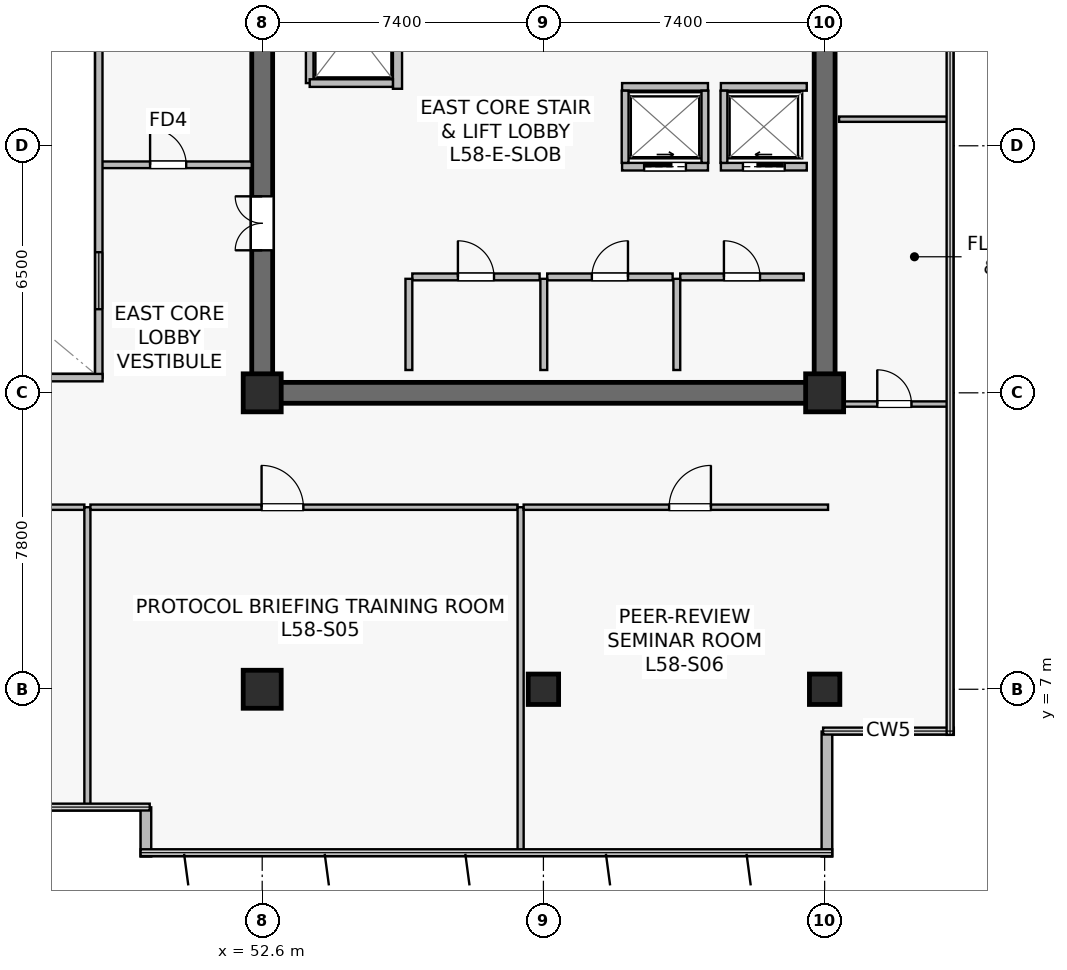
"""IFC4 building model, lengths in metres.
Left out: names, types, materials, properties, quantities, classifications, styles, units other than length and angle.
Written with IfcOpenShell. Run it as: python <this file> out.ifc"""

import sys

from ifc_helpers import new_model, si_unit, direction, frame, frame_2d, origin, origin_2d, place, context, subcontext, project, spatial, rectangle, extrude, source, transform, mapped, element, fill, save


model = new_model("IFC4")
c1 = context("Model", 3, precision=1e-05, world=origin(), true_north=direction((0.0, 1.0)))
c2 = subcontext(c1, "Body", "Model", "MODEL_VIEW")
j1 = project(units=[si_unit("LENGTHUNIT", "METRE"), si_unit("PLANEANGLEUNIT", "RADIAN")], contexts=[c1])
p1 = place(None, origin())
s1 = spatial("IfcSite", under=j1, at=p1, CompositionType="ELEMENT")
p2 = place(p1, origin())
s2 = spatial("IfcBuilding", under=s1, at=p2, CompositionType="ELEMENT")
p3 = place(p2, frame((0.0, 0.0, 242.4)))
s3 = spatial("IfcBuildingStorey", under=s2, at=p3, CompositionType="ELEMENT", Elevation=242.4)
p4 = place(p3, frame((52.325, 14.8, 0.0), z_axis=(0.0, 0.0, 1.0), x_axis=(1.0, 0.0, 0.0)))
e1 = element("IfcWall", 1, at=p4, inside=s3, PredefinedType="SHEAR", context=c2, shape_type="SweptSolid", body=[
    extrude(rectangle(XDim=15.35, YDim=0.55, at=frame_2d((7.675, 0.0))), origin(), (0.0, 0.0, 1.0), 3.8),
])
p5 = place(p3, frame((52.6, 15.075, 0.0), z_axis=(0.0, 0.0, 1.0), x_axis=(0.0, 1.0, 0.0)))
e2 = element("IfcWall", 2, at=p5, inside=s3, PredefinedType="SHEAR", context=c2, shape_type="SweptSolid", body=[
    extrude(rectangle(XDim=18.45, YDim=0.55, at=frame_2d((9.225, 0.0))), origin(), (0.0, 0.0, 1.0), 3.8),
])
p6 = place(p5, frame((3.475, 0.0, 0.0)))
e3 = element("IfcOpeningElement", 3, at=p6, cuts=e2, PredefinedType="OPENING", context=c2, shape_type="SweptSolid", body=[
    extrude(rectangle(XDim=1.42, YDim=2.2, at=frame_2d((0.71, 1.1))), frame((0.0, 0.285, 0.0), z_axis=(0.0, -1.0, 0.0), x_axis=(1.0, 0.0, 0.0)), (0.0, 0.0, 1.0), 0.57),
])
p7 = place(p3, frame((67.4, 15.075, 0.0), z_axis=(0.0, 0.0, 1.0), x_axis=(0.0, 1.0, 0.0)))
e4 = element("IfcWall", 4, at=p7, inside=s3, PredefinedType="SHEAR", context=c2, shape_type="SweptSolid", body=[
    extrude(rectangle(XDim=18.45, YDim=0.55, at=frame_2d((9.225, 0.0))), origin(), (0.0, 0.0, 1.0), 3.8),
])
m1 = source(origin(), c2, "Body", "SweptSolid", [
    extrude(rectangle(XDim=1.0, YDim=1.0, at=origin_2d()), origin(), (0.0, 0.0, 1.0), 4.1),
])
p8 = place(p3, frame((52.6, 7.0, 0.0), z_axis=(0.0, 0.0, 1.0), x_axis=(1.0, 0.0, 0.0)))
e5 = element("IfcColumn", 5, at=p8, inside=s3, PredefinedType="COLUMN", context=c2, shape_type="MappedRepresentation", body=[
    mapped(m1, transform((0.0, 0.0, 0.0), scale=1.0)),
])
m2 = source(origin(), c2, "Body", "SweptSolid", [
    extrude(rectangle(XDim=0.8, YDim=0.8, at=origin_2d()), origin(), (0.0, 0.0, 1.0), 4.1),
])
p9 = place(p3, frame((60.0, 7.0, 0.0), z_axis=(0.0, 0.0, 1.0), x_axis=(1.0, 0.0, 0.0)))
e6 = element("IfcColumn", 6, at=p9, inside=s3, PredefinedType="COLUMN", context=c2, shape_type="MappedRepresentation", body=[
    mapped(m2, transform((0.0, 0.0, 0.0), scale=1.0)),
])
for number, where, z_axis, x_axis in (
    (7, (52.6, 14.8, 0.0), (0.0, 0.0, 1.0), (1.0, 0.0, 0.0)),
    (8, (67.4, 14.8, 0.0), (0.0, 0.0, 1.0), (1.0, 0.0, 0.0)),
):
    element("IfcColumn", number, at=place(p3, frame(where, z_axis=z_axis, x_axis=x_axis)), inside=s3, PredefinedType="COLUMN", context=c2, shape_type="MappedRepresentation", body=[
        mapped(m1, transform((0.0, 0.0, 0.0), scale=1.0)),
    ])
p10 = place(p3, frame((67.4, 7.0, 0.0), z_axis=(0.0, 0.0, 1.0), x_axis=(1.0, 0.0, 0.0)))
e9 = element("IfcColumn", 9, at=p10, inside=s3, PredefinedType="COLUMN", context=c2, shape_type="MappedRepresentation", body=[
    mapped(m2, transform((0.0, 0.0, 0.0), scale=1.0)),
])
p11 = place(p3, frame((49.54, 3.893, 0.0), z_axis=(0.0, 0.0, 1.0), x_axis=(0.0, -1.0, 0.0)))
e10 = element("IfcWall", 10, at=p11, inside=s3, PredefinedType="STANDARD", context=c2, shape_type="SweptSolid", body=[
    extrude(rectangle(XDim=1.293, YDim=0.28, at=frame_2d((0.646, 0.0))), origin(), (0.0, 0.0, 1.0), 3.8),
])
p12 = place(p3, frame((67.46, 2.6, 0.0), z_axis=(0.0, 0.0, 1.0), x_axis=(0.0, 1.0, 0.0)))
e11 = element("IfcWall", 11, at=p12, inside=s3, PredefinedType="STANDARD", context=c2, shape_type="SweptSolid", body=[
    extrude(rectangle(XDim=3.288, YDim=0.28, at=frame_2d((1.644, 0.0))), origin(), (0.0, 0.0, 1.0), 3.8),
])
p13 = place(p3, frame((56.16, 22.8, 0.0), z_axis=(0.0, 0.0, 1.0), x_axis=(0.0, 1.0, 0.0)))
e12 = element("IfcWall", 12, at=p13, inside=s3, PredefinedType="SOLIDWALL", context=c2, shape_type="SweptSolid", body=[
    extrude(rectangle(XDim=6.85, YDim=0.24, at=frame_2d((3.425, 0.0))), origin(), (0.0, 0.0, 1.0), 2.935),
])
p14 = place(p13, frame((4.85, 0.0, 0.0)))
e13 = element("IfcOpeningElement", 13, at=p14, cuts=e12, PredefinedType="OPENING", context=c2, shape_type="SweptSolid", body=[
    extrude(rectangle(XDim=1.1, YDim=2.22, at=frame_2d((0.55, 1.11))), frame((0.0, 0.13, 0.0), z_axis=(0.0, -1.0, 0.0), x_axis=(1.0, 0.0, 0.0)), (0.0, 0.0, 1.0), 0.26),
])
p15 = place(p13, frame((1.0, 0.0, 0.0)))
e14 = element("IfcOpeningElement", 14, at=p15, cuts=e12, PredefinedType="OPENING", context=c2, shape_type="SweptSolid", body=[
    extrude(rectangle(XDim=1.2, YDim=2.22, at=frame_2d((0.6, 1.11))), frame((0.0, 0.13, 0.0), z_axis=(0.0, -1.0, 0.0), x_axis=(1.0, 0.0, 0.0)), (0.0, 0.0, 1.0), 0.26),
])
p16 = place(p3, frame((64.67, 20.75, 0.0), z_axis=(0.0, 0.0, 1.0), x_axis=(1.0, 0.0, 0.0)))
e15 = element("IfcWall", 15, at=p16, inside=s3, PredefinedType="SOLIDWALL", context=c2, shape_type="SweptSolid", body=[
    extrude(rectangle(XDim=2.26, YDim=0.2, at=frame_2d((1.13, 0.0))), origin(), (0.0, 0.0, 1.0), 3.8),
])
p17 = place(p16, frame((0.58, 0.0, 0.0)))
e16 = element("IfcOpeningElement", 16, at=p17, cuts=e15, PredefinedType="OPENING", context=c2, shape_type="SweptSolid", body=[
    extrude(rectangle(XDim=1.1, YDim=2.22, at=frame_2d((0.55, 1.11))), frame((0.0, 0.11, 0.0), z_axis=(0.0, -1.0, 0.0), x_axis=(1.0, 0.0, 0.0)), (0.0, 0.0, 1.0), 0.22),
])
p18 = place(p3, frame((64.67, 22.85, 0.0), z_axis=(0.0, 0.0, 1.0), x_axis=(1.0, 0.0, 0.0)))
e17 = element("IfcWall", 17, at=p18, inside=s3, PredefinedType="SOLIDWALL", context=c2, shape_type="SweptSolid", body=[
    extrude(rectangle(XDim=2.26, YDim=0.2, at=frame_2d((1.13, 0.0))), origin(), (0.0, 0.0, 1.0), 3.8),
])
p19 = place(p3, frame((64.75, 20.85, 0.0), z_axis=(0.0, 0.0, 1.0), x_axis=(0.0, 1.0, 0.0)))
e18 = element("IfcWall", 18, at=p19, inside=s3, PredefinedType="SOLIDWALL", context=c2, shape_type="SweptSolid", body=[
    extrude(rectangle(XDim=1.9, YDim=0.18, at=frame_2d((0.95, 0.0))), origin(), (0.0, 0.0, 1.0), 3.8),
])
p20 = place(p3, frame((62.07, 20.75, 0.0), z_axis=(0.0, 0.0, 1.0), x_axis=(1.0, 0.0, 0.0)))
e19 = element("IfcWall", 19, at=p20, inside=s3, PredefinedType="SOLIDWALL", context=c2, shape_type="SweptSolid", body=[
    extrude(rectangle(XDim=2.26, YDim=0.2, at=frame_2d((1.13, 0.0))), origin(), (0.0, 0.0, 1.0), 3.8),
])
p21 = place(p20, frame((0.58, 0.0, 0.0)))
e20 = element("IfcOpeningElement", 20, at=p21, cuts=e19, PredefinedType="OPENING", context=c2, shape_type="SweptSolid", body=[
    extrude(rectangle(XDim=1.1, YDim=2.22, at=frame_2d((0.55, 1.11))), frame((0.0, 0.11, 0.0), z_axis=(0.0, -1.0, 0.0), x_axis=(1.0, 0.0, 0.0)), (0.0, 0.0, 1.0), 0.22),
])
p22 = place(p3, frame((62.07, 22.85, 0.0), z_axis=(0.0, 0.0, 1.0), x_axis=(1.0, 0.0, 0.0)))
e21 = element("IfcWall", 21, at=p22, inside=s3, PredefinedType="SOLIDWALL", context=c2, shape_type="SweptSolid", body=[
    extrude(rectangle(XDim=2.26, YDim=0.2, at=frame_2d((1.13, 0.0))), origin(), (0.0, 0.0, 1.0), 3.8),
])
for number, where, z_axis, x_axis in (
    (22, (62.15, 20.85, 0.0), (0.0, 0.0, 1.0), (0.0, 1.0, 0.0)),
    (23, (64.25, 20.85, 0.0), (0.0, 0.0, 1.0), (0.0, 1.0, 0.0)),
):
    element("IfcWall", number, at=place(p3, frame(where, z_axis=z_axis, x_axis=x_axis)), inside=s3, PredefinedType="SOLIDWALL", context=c2, shape_type="SweptSolid", body=[
        extrude(rectangle(XDim=1.9, YDim=0.18, at=frame_2d((0.95, 0.0))), origin(), (0.0, 0.0, 1.0), 3.8),
    ])
p23 = place(p3, frame((53.85, 22.95, 0.0), z_axis=(0.0, 0.0, 1.0), x_axis=(0.0, 1.0, 0.0)))
e24 = element("IfcWall", 24, at=p23, inside=s3, PredefinedType="SOLIDWALL", context=c2, shape_type="SweptSolid", body=[
    extrude(rectangle(XDim=2.9, YDim=0.2, at=frame_2d((1.45, 0.0))), origin(), (0.0, 0.0, 1.0), 2.935),
])
p24 = place(p3, frame((53.85, 22.95, 0.0), z_axis=(0.0, 0.0, 1.0), x_axis=(1.0, 0.0, 0.0)))
e25 = element("IfcWall", 25, at=p24, inside=s3, PredefinedType="SOLIDWALL", context=c2, shape_type="SweptSolid", body=[
    extrude(rectangle(XDim=2.19, YDim=0.2, at=frame_2d((1.095, 0.0))), origin(), (0.0, 0.0, 1.0), 3.8),
])
p25 = place(p3, frame((63.6, 17.85, 0.0), z_axis=(0.0, 0.0, 1.0), x_axis=(1.0, 0.0, 0.0)))
e26 = element("IfcWall", 26, at=p25, inside=s3, PredefinedType="SOLIDWALL", context=c2, shape_type="SweptSolid", body=[
    extrude(rectangle(XDim=3.25, YDim=0.18, at=frame_2d((1.625, 0.0))), origin(), (0.0, 0.0, 1.0), 3.8),
])
p26 = place(p25, frame((1.15, 0.0, 0.0)))
e27 = element("IfcOpeningElement", 27, at=p26, cuts=e26, PredefinedType="OPENING", context=c2, shape_type="SweptSolid", body=[
    extrude(rectangle(XDim=0.95, YDim=2.15, at=frame_2d((0.475, 1.075))), frame((0.0, 0.1, 0.0), z_axis=(0.0, -1.0, 0.0), x_axis=(1.0, 0.0, 0.0)), (0.0, 0.0, 1.0), 0.2),
])
p27 = place(p3, frame((63.51, 15.4, 0.0), z_axis=(0.0, 0.0, 1.0), x_axis=(0.0, 1.0, 0.0)))
e28 = element("IfcWall", 28, at=p27, inside=s3, PredefinedType="SOLIDWALL", context=c2, shape_type="SweptSolid", body=[
    extrude(rectangle(XDim=2.4, YDim=0.18, at=frame_2d((1.2, 0.0))), origin(), (0.0, 0.0, 1.0), 3.8),
])
p28 = place(p3, frame((60.1, 17.85, 0.0), z_axis=(0.0, 0.0, 1.0), x_axis=(1.0, 0.0, 0.0)))
e29 = element("IfcWall", 29, at=p28, inside=s3, PredefinedType="SOLIDWALL", context=c2, shape_type="SweptSolid", body=[
    extrude(rectangle(XDim=3.3, YDim=0.18, at=frame_2d((1.65, 0.0))), origin(), (0.0, 0.0, 1.0), 3.197),
])
p29 = place(p28, frame((1.175, 0.0, 0.0)))
e30 = element("IfcOpeningElement", 30, at=p29, cuts=e29, PredefinedType="OPENING", context=c2, shape_type="SweptSolid", body=[
    extrude(rectangle(XDim=0.95, YDim=2.15, at=frame_2d((0.475, 1.075))), frame((0.0, 0.1, 0.0), z_axis=(0.0, -1.0, 0.0), x_axis=(1.0, 0.0, 0.0)), (0.0, 0.0, 1.0), 0.2),
])
p30 = place(p3, frame((60.01, 15.4, 0.0), z_axis=(0.0, 0.0, 1.0), x_axis=(0.0, 1.0, 0.0)))
e31 = element("IfcWall", 31, at=p30, inside=s3, PredefinedType="SOLIDWALL", context=c2, shape_type="SweptSolid", body=[
    extrude(rectangle(XDim=2.4, YDim=0.18, at=frame_2d((1.2, 0.0))), origin(), (0.0, 0.0, 1.0), 3.197),
])
p31 = place(p3, frame((56.55, 17.85, 0.0), z_axis=(0.0, 0.0, 1.0), x_axis=(1.0, 0.0, 0.0)))
e32 = element("IfcWall", 32, at=p31, inside=s3, PredefinedType="SOLIDWALL", context=c2, shape_type="SweptSolid", body=[
    extrude(rectangle(XDim=3.35, YDim=0.18, at=frame_2d((1.675, 0.0))), origin(), (0.0, 0.0, 1.0), 3.197),
])
p32 = place(p31, frame((1.2, 0.0, 0.0)))
e33 = element("IfcOpeningElement", 33, at=p32, cuts=e32, PredefinedType="OPENING", context=c2, shape_type="SweptSolid", body=[
    extrude(rectangle(XDim=0.95, YDim=2.15, at=frame_2d((0.475, 1.075))), frame((0.0, 0.1, 0.0), z_axis=(0.0, -1.0, 0.0), x_axis=(1.0, 0.0, 0.0)), (0.0, 0.0, 1.0), 0.2),
])
p33 = place(p3, frame((56.46, 15.4, 0.0), z_axis=(0.0, 0.0, 1.0), x_axis=(0.0, 1.0, 0.0)))
e34 = element("IfcWall", 34, at=p33, inside=s3, PredefinedType="SOLIDWALL", context=c2, shape_type="SweptSolid", body=[
    extrude(rectangle(XDim=2.4, YDim=0.18, at=frame_2d((1.2, 0.0))), origin(), (0.0, 0.0, 1.0), 3.8),
])
p34 = place(p3, frame((48.3, 20.8, 0.0), z_axis=(0.0, 0.0, 1.0), x_axis=(1.0, 0.0, 0.0)))
e35 = element("IfcWall", 35, at=p34, inside=s3, PredefinedType="PARTITIONING", context=c2, shape_type="SweptSolid", body=[
    extrude(rectangle(XDim=4.025, YDim=0.175, at=frame_2d((2.012, 0.0))), origin(), (0.0, 0.0, 1.0), 3.8),
])
p35 = place(p34, frame((1.35, 0.0, 0.0)))
e36 = element("IfcOpeningElement", 36, at=p35, cuts=e35, PredefinedType="OPENING", context=c2, shape_type="SweptSolid", body=[
    extrude(rectangle(XDim=0.95, YDim=2.15, at=frame_2d((0.475, 1.075))), frame((0.0, 0.098, 0.0), z_axis=(0.0, -1.0, 0.0), x_axis=(1.0, 0.0, 0.0)), (0.0, 0.0, 1.0), 0.195),
])
p36 = place(p3, frame((48.3, 15.2, 0.0), z_axis=(0.0, 0.0, 1.0), x_axis=(0.0, 1.0, 0.0)))
e37 = element("IfcWall", 37, at=p36, inside=s3, PredefinedType="SOLIDWALL", context=c2, shape_type="SweptSolid", body=[
    extrude(rectangle(XDim=18.2, YDim=0.195, at=frame_2d((9.1, 0.0))), origin(), (0.0, 0.0, 1.0), 3.8),
])
p37 = place(p36, frame((1.8, 0.0, 0.9)))
e38 = element("IfcOpeningElement", 38, at=p37, cuts=e37, PredefinedType="OPENING", context=c2, shape_type="SweptSolid", body=[
    extrude(rectangle(XDim=1.5, YDim=1.4, at=frame_2d((0.75, 0.7))), frame((0.0, 0.107, 0.0), z_axis=(0.0, -1.0, 0.0), x_axis=(1.0, 0.0, 0.0)), (0.0, 0.0, 1.0), 0.215),
])
p38 = place(p36, frame((13.2, 0.0, 0.9)))
e39 = element("IfcOpeningElement", 39, at=p38, cuts=e37, PredefinedType="OPENING", context=c2, shape_type="SweptSolid", body=[
    extrude(rectangle(XDim=1.5, YDim=1.4, at=frame_2d((0.75, 0.7))), frame((0.0, 0.107, 0.0), z_axis=(0.0, -1.0, 0.0), x_axis=(1.0, 0.0, 0.0)), (0.0, 0.0, 1.0), 0.215),
])
p39 = place(p3, frame((26.4, 15.2, 0.0), z_axis=(0.0, 0.0, 1.0), x_axis=(1.0, 0.0, 0.0)))
e40 = element("IfcWall", 40, at=p39, inside=s3, PredefinedType="SOLIDWALL", context=c2, shape_type="SweptSolid", body=[
    extrude(rectangle(XDim=22.0, YDim=0.195, at=frame_2d((11.0, 0.0))), origin(), (0.0, 0.0, 1.0), 3.8),
])
p40 = place(p3, frame((36.48, 11.79, 0.0), z_axis=(0.0, 0.0, 1.0), x_axis=(1.0, 0.0, 0.0)))
e41 = element("IfcWall", 41, at=p40, inside=s3, PredefinedType="PARTITIONING", context=c2, shape_type="SweptSolid", body=[
    extrude(rectangle(XDim=11.44, YDim=0.14, at=frame_2d((5.72, 0.0))), origin(), (0.0, 0.0, 1.0), 3.197),
])
p41 = place(p40, frame((5.748, 0.0, 0.0)))
e42 = element("IfcOpeningElement", 42, at=p41, cuts=e41, PredefinedType="OPENING", context=c2, shape_type="SweptSolid", body=[
    extrude(rectangle(XDim=1.1, YDim=2.18, at=frame_2d((0.55, 1.09))), frame((0.0, 0.08, 0.0), z_axis=(0.0, -1.0, 0.0), x_axis=(1.0, 0.0, 0.0)), (0.0, 0.0, 1.0), 0.16),
])
p42 = place(p3, frame((48.0, 3.91, 0.0), z_axis=(0.0, 0.0, 1.0), x_axis=(0.0, 1.0, 0.0)))
e43 = element("IfcWall", 43, at=p42, inside=s3, PredefinedType="PARTITIONING", context=c2, shape_type="SweptSolid", body=[
    extrude(rectangle(XDim=7.88, YDim=0.16, at=frame_2d((3.94, 0.0))), origin(), (0.0, 0.0, 1.0), 3.135),
])
p43 = place(p3, frame((48.08, 11.79, 0.0), z_axis=(0.0, 0.0, 1.0), x_axis=(1.0, 0.0, 0.0)))
e44 = element("IfcWall", 44, at=p43, inside=s3, PredefinedType="PARTITIONING", context=c2, shape_type="SweptSolid", body=[
    extrude(rectangle(XDim=11.24, YDim=0.14, at=frame_2d((5.62, 0.0))), origin(), (0.0, 0.0, 1.0), 3.197),
])
p44 = place(p43, frame((4.504, 0.0, 0.0)))
e45 = element("IfcOpeningElement", 45, at=p44, cuts=e44, PredefinedType="OPENING", context=c2, shape_type="SweptSolid", body=[
    extrude(rectangle(XDim=1.1, YDim=2.18, at=frame_2d((0.55, 1.09))), frame((0.0, 0.08, 0.0), z_axis=(0.0, -1.0, 0.0), x_axis=(1.0, 0.0, 0.0)), (0.0, 0.0, 1.0), 0.16),
])
p45 = place(p3, frame((59.4, 2.71, 0.0), z_axis=(0.0, 0.0, 1.0), x_axis=(0.0, 1.0, 0.0)))
e46 = element("IfcWall", 46, at=p45, inside=s3, PredefinedType="PARTITIONING", context=c2, shape_type="SweptSolid", body=[
    extrude(rectangle(XDim=9.08, YDim=0.16, at=frame_2d((4.54, 0.0))), origin(), (0.0, 0.0, 1.0), 3.135),
])
p46 = place(p3, frame((59.48, 11.79, 0.0), z_axis=(0.0, 0.0, 1.0), x_axis=(1.0, 0.0, 0.0)))
e47 = element("IfcWall", 47, at=p46, inside=s3, PredefinedType="PARTITIONING", context=c2, shape_type="SweptSolid", body=[
    extrude(rectangle(XDim=8.01, YDim=0.14, at=frame_2d((4.005, 0.0))), origin(), (0.0, 0.0, 1.0), 3.197),
])
p47 = place(p46, frame((3.828, 0.0, 0.0)))
e48 = element("IfcOpeningElement", 48, at=p47, cuts=e47, PredefinedType="OPENING", context=c2, shape_type="SweptSolid", body=[
    extrude(rectangle(XDim=1.1, YDim=2.18, at=frame_2d((0.55, 1.09))), frame((0.0, 0.08, 0.0), z_axis=(0.0, -1.0, 0.0), x_axis=(1.0, 0.0, 0.0)), (0.0, 0.0, 1.0), 0.16),
])
p48 = place(p3, frame((67.78, 22.0, 0.0), z_axis=(0.0, 0.0, 1.0), x_axis=(1.0, 0.0, 0.0)))
e49 = element("IfcWall", 49, at=p48, inside=s3, PredefinedType="PARTITIONING", context=c2, shape_type="SweptSolid", body=[
    extrude(rectangle(XDim=2.91, YDim=0.14, at=frame_2d((1.455, 0.0))), origin(), (0.0, 0.0, 1.0), 3.8),
])
p49 = place(p3, frame((67.78, 14.505, 0.0), z_axis=(0.0, 0.0, 1.0), x_axis=(1.0, 0.0, 0.0)))
e50 = element("IfcWall", 50, at=p49, inside=s3, PredefinedType="PARTITIONING", context=c2, shape_type="SweptSolid", body=[
    extrude(rectangle(XDim=2.91, YDim=0.14, at=frame_2d((1.455, 0.0))), origin(), (0.0, 0.0, 1.0), 3.8),
])
p50 = place(p49, frame((1.005, 0.0, 0.0)))
e51 = element("IfcOpeningElement", 51, at=p50, cuts=e50, PredefinedType="OPENING", context=c2, shape_type="SweptSolid", body=[
    extrude(rectangle(XDim=0.9, YDim=2.1, at=frame_2d((0.45, 1.05))), frame((0.0, 0.08, 0.0), z_axis=(0.0, -1.0, 0.0), x_axis=(1.0, 0.0, 0.0)), (0.0, 0.0, 1.0), 0.16),
])
m3 = source(origin(), c2, "Body", "SweptSolid", [
    extrude(rectangle(XDim=1.5, YDim=1.4, at=frame_2d((0.75, 0.7))), frame((0.0, 0.03, 0.0), z_axis=(0.0, -1.0, 0.0), x_axis=(1.0, 0.0, 0.0)), (0.0, 0.0, 1.0), 0.06),
])
p51 = place(p37, origin())
e52 = element("IfcWindow", 52, at=p51, inside=s3, PartitioningType="SINGLE_PANEL", PredefinedType="WINDOW", context=c2, shape_type="MappedRepresentation", body=[
    mapped(m3, transform((0.0, 0.0, 0.0), scale=1.0)),
])
fill(e38, e52)
m4 = source(origin(), c2, "Body", "SweptSolid", [
    extrude(rectangle(XDim=1.1, YDim=2.22, at=frame_2d((0.55, 1.11))), frame((0.0, 0.025, 0.0), z_axis=(0.0, -1.0, 0.0), x_axis=(1.0, 0.0, 0.0)), (0.0, 0.0, 1.0), 0.05),
])
p52 = place(p17, origin())
e53 = element("IfcDoor", 53, at=p52, inside=s3, OperationType="SLIDING_TO_LEFT", PredefinedType="USERDEFINED", context=c2, shape_type="MappedRepresentation", body=[
    mapped(m4, transform((0.0, 0.0, 0.0), scale=1.0)),
])
fill(e16, e53)
p53 = place(p21, origin())
e54 = element("IfcDoor", 54, at=p53, inside=s3, OperationType="SLIDING_TO_RIGHT", PredefinedType="USERDEFINED", context=c2, shape_type="MappedRepresentation", body=[
    mapped(m4, transform((0.0, 0.0, 0.0), scale=1.0)),
])
fill(e20, e54)
m5 = source(origin(), c2, "Body", "SweptSolid", [
    extrude(rectangle(XDim=0.95, YDim=2.15, at=frame_2d((0.475, 1.075))), frame((0.0, 0.025, 0.0), z_axis=(0.0, -1.0, 0.0), x_axis=(1.0, 0.0, 0.0)), (0.0, 0.0, 1.0), 0.05),
])
p54 = place(p26, origin())
e55 = element("IfcDoor", 55, at=p54, inside=s3, OperationType="SINGLE_SWING_LEFT", PredefinedType="DOOR", context=c2, shape_type="MappedRepresentation", body=[
    mapped(m5, transform((0.0, 0.0, 0.0), scale=1.0)),
])
fill(e27, e55)
p55 = place(p29, origin())
e56 = element("IfcDoor", 56, at=p55, inside=s3, OperationType="SINGLE_SWING_RIGHT", PredefinedType="DOOR", context=c2, shape_type="MappedRepresentation", body=[
    mapped(m5, transform((0.0, 0.0, 0.0), scale=1.0)),
])
fill(e30, e56)
p56 = place(p32, origin())
e57 = element("IfcDoor", 57, at=p56, inside=s3, OperationType="SINGLE_SWING_LEFT", PredefinedType="DOOR", context=c2, shape_type="MappedRepresentation", body=[
    mapped(m5, transform((0.0, 0.0, 0.0), scale=1.0)),
])
fill(e33, e57)
m6 = source(origin(), c2, "Body", "SweptSolid", [
    extrude(rectangle(XDim=1.42, YDim=2.2, at=frame_2d((0.71, 1.1))), frame((0.0, 0.025, 0.0), z_axis=(0.0, -1.0, 0.0), x_axis=(1.0, 0.0, 0.0)), (0.0, 0.0, 1.0), 0.05),
])
p57 = place(p6, origin())
e58 = element("IfcDoor", 58, at=p57, inside=s3, OperationType="DOUBLE_DOOR_SINGLE_SWING", PredefinedType="DOOR", context=c2, shape_type="MappedRepresentation", body=[
    mapped(m6, transform((0.0, 0.0, 0.0), scale=1.0)),
])
fill(e3, e58)
p58 = place(p35, origin())
e59 = element("IfcDoor", 59, at=p58, inside=s3, OperationType="SINGLE_SWING_LEFT", PredefinedType="DOOR", context=c2, shape_type="MappedRepresentation", body=[
    mapped(m5, transform((0.0, 0.0, 0.0), scale=1.0)),
])
fill(e36, e59)
m7 = source(origin(), c2, "Body", "SweptSolid", [
    extrude(rectangle(XDim=1.1, YDim=2.18, at=frame_2d((0.55, 1.09))), frame((0.0, 0.025, 0.0), z_axis=(0.0, -1.0, 0.0), x_axis=(1.0, 0.0, 0.0)), (0.0, 0.0, 1.0), 0.05),
])
p59 = place(p44, origin())
e60 = element("IfcDoor", 60, at=p59, inside=s3, OperationType="SINGLE_SWING_LEFT", PredefinedType="DOOR", context=c2, shape_type="MappedRepresentation", body=[
    mapped(m7, transform((0.0, 0.0, 0.0), scale=1.0)),
])
fill(e45, e60)
p60 = place(p47, origin())
e61 = element("IfcDoor", 61, at=p60, inside=s3, OperationType="SINGLE_SWING_RIGHT", PredefinedType="DOOR", context=c2, shape_type="MappedRepresentation", body=[
    mapped(m7, transform((0.0, 0.0, 0.0), scale=1.0)),
])
fill(e48, e61)
m8 = source(origin(), c2, "Body", "SweptSolid", [
    extrude(rectangle(XDim=0.9, YDim=2.1, at=frame_2d((0.45, 1.05))), frame((0.0, 0.025, 0.0), z_axis=(0.0, -1.0, 0.0), x_axis=(1.0, 0.0, 0.0)), (0.0, 0.0, 1.0), 0.05),
])
p61 = place(p50, origin())
e62 = element("IfcDoor", 62, at=p61, inside=s3, OperationType="SINGLE_SWING_LEFT", PredefinedType="DOOR", context=c2, shape_type="MappedRepresentation", body=[
    mapped(m8, transform((0.0, 0.0, 0.0), scale=1.0)),
])
fill(e51, e62)
save(model, sys.argv[1])
